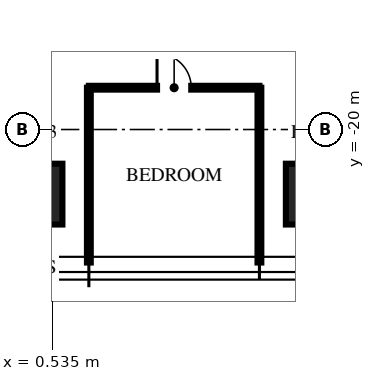
"""IFC4 building model, lengths in metres.
Left out: names, types, materials, properties, quantities, classifications, styles, units other than length and angle.
Written with IfcOpenShell. Run it as: python <this file> out.ifc"""

import sys

from ifc_helpers import new_model, si_unit, direction, frame, frame_2d, origin, origin_2d, place, context, subcontext, project, spatial, rectangle, extrude, element, fill, save


model = new_model("IFC4")
c1 = context("Model", 3, precision=1e-05, world=origin(), true_north=direction((0.0, 1.0)))
c2 = subcontext(c1, "Body", "Model", "MODEL_VIEW")
j1 = project(units=[si_unit("LENGTHUNIT", "METRE"), si_unit("PLANEANGLEUNIT", "RADIAN")], contexts=[c1])
p1 = place(None, origin())
s1 = spatial("IfcSite", under=j1, at=p1, CompositionType="ELEMENT")
p2 = place(p1, origin())
s2 = spatial("IfcBuilding", under=s1, at=p2, CompositionType="ELEMENT")
p3 = place(p2, frame((0.0, 0.0, 300.75)))
s3 = spatial("IfcBuildingStorey", under=s2, at=p3, CompositionType="ELEMENT", Elevation=300.75)
for number, where, z_axis, x_axis in (
    (1, (7.48, -21.7, 0.0), (0.0, 0.0, 1.0), (1.0, 0.0, 0.0)),
    (2, (0.0, -21.7, 0.0), (0.0, 0.0, 1.0), (1.0, 0.0, 0.0)),
):
    element("IfcColumn", number, at=place(p3, frame(where, z_axis=z_axis, x_axis=x_axis)), inside=s3, PredefinedType="COLUMN", context=c2, shape_type="SweptSolid", body=[
        extrude(rectangle(XDim=1.6, YDim=1.6, at=origin_2d()), origin(), (0.0, 0.0, 1.0), 3.75),
    ])
for number, where, z_axis, x_axis in (
    (3, (1.496, -18.9, 0.0), (0.0, 0.0, 1.0), (0.0, -1.0, 0.0)),
    (4, (5.984, -18.9, 0.0), (0.0, 0.0, 1.0), (0.0, -1.0, 0.0)),
):
    element("IfcWall", number, at=place(p3, frame(where, z_axis=z_axis, x_axis=x_axis)), inside=s3, PredefinedType="PARTITIONING", context=c2, shape_type="SweptSolid", body=[
        extrude(rectangle(XDim=4.6, YDim=0.1, at=frame_2d((2.3, 0.0))), origin(), (0.0, 0.0, 1.0), 3.01),
    ])
p4 = place(p3, frame((1.496, -18.9, 0.0), z_axis=(0.0, 0.0, 1.0), x_axis=(1.0, 0.0, 0.0)))
e5 = element("IfcWall", 5, at=p4, inside=s3, PredefinedType="PARTITIONING", context=c2, shape_type="SweptSolid", body=[
    extrude(rectangle(XDim=4.488, YDim=0.1, at=frame_2d((2.244, 0.0))), origin(), (0.0, 0.0, 1.0), 2.91),
])
p5 = place(p4, frame((1.794, 0.0, 0.0)))
e6 = element("IfcOpeningElement", 6, at=p5, cuts=e5, PredefinedType="OPENING", context=c2, shape_type="SweptSolid", body=[
    extrude(rectangle(XDim=0.9, YDim=2.1, at=frame_2d((0.45, 1.05))), frame((0.0, 0.06, 0.0), z_axis=(0.0, -1.0, 0.0), x_axis=(1.0, 0.0, 0.0)), (0.0, 0.0, 1.0), 0.12),
])
p6 = place(p5, origin())
e7 = element("IfcDoor", 7, at=p6, inside=s3, OperationType="SINGLE_SWING_LEFT", PredefinedType="DOOR", context=c2, shape_type="SweptSolid", body=[
    extrude(rectangle(XDim=0.9, YDim=2.1, at=frame_2d((0.45, 1.05))), frame((0.0, 0.025, 0.0), z_axis=(0.0, -1.0, 0.0), x_axis=(1.0, 0.0, 0.0)), (0.0, 0.0, 1.0), 0.05),
])
fill(e6, e7)
save(model, sys.argv[1])
